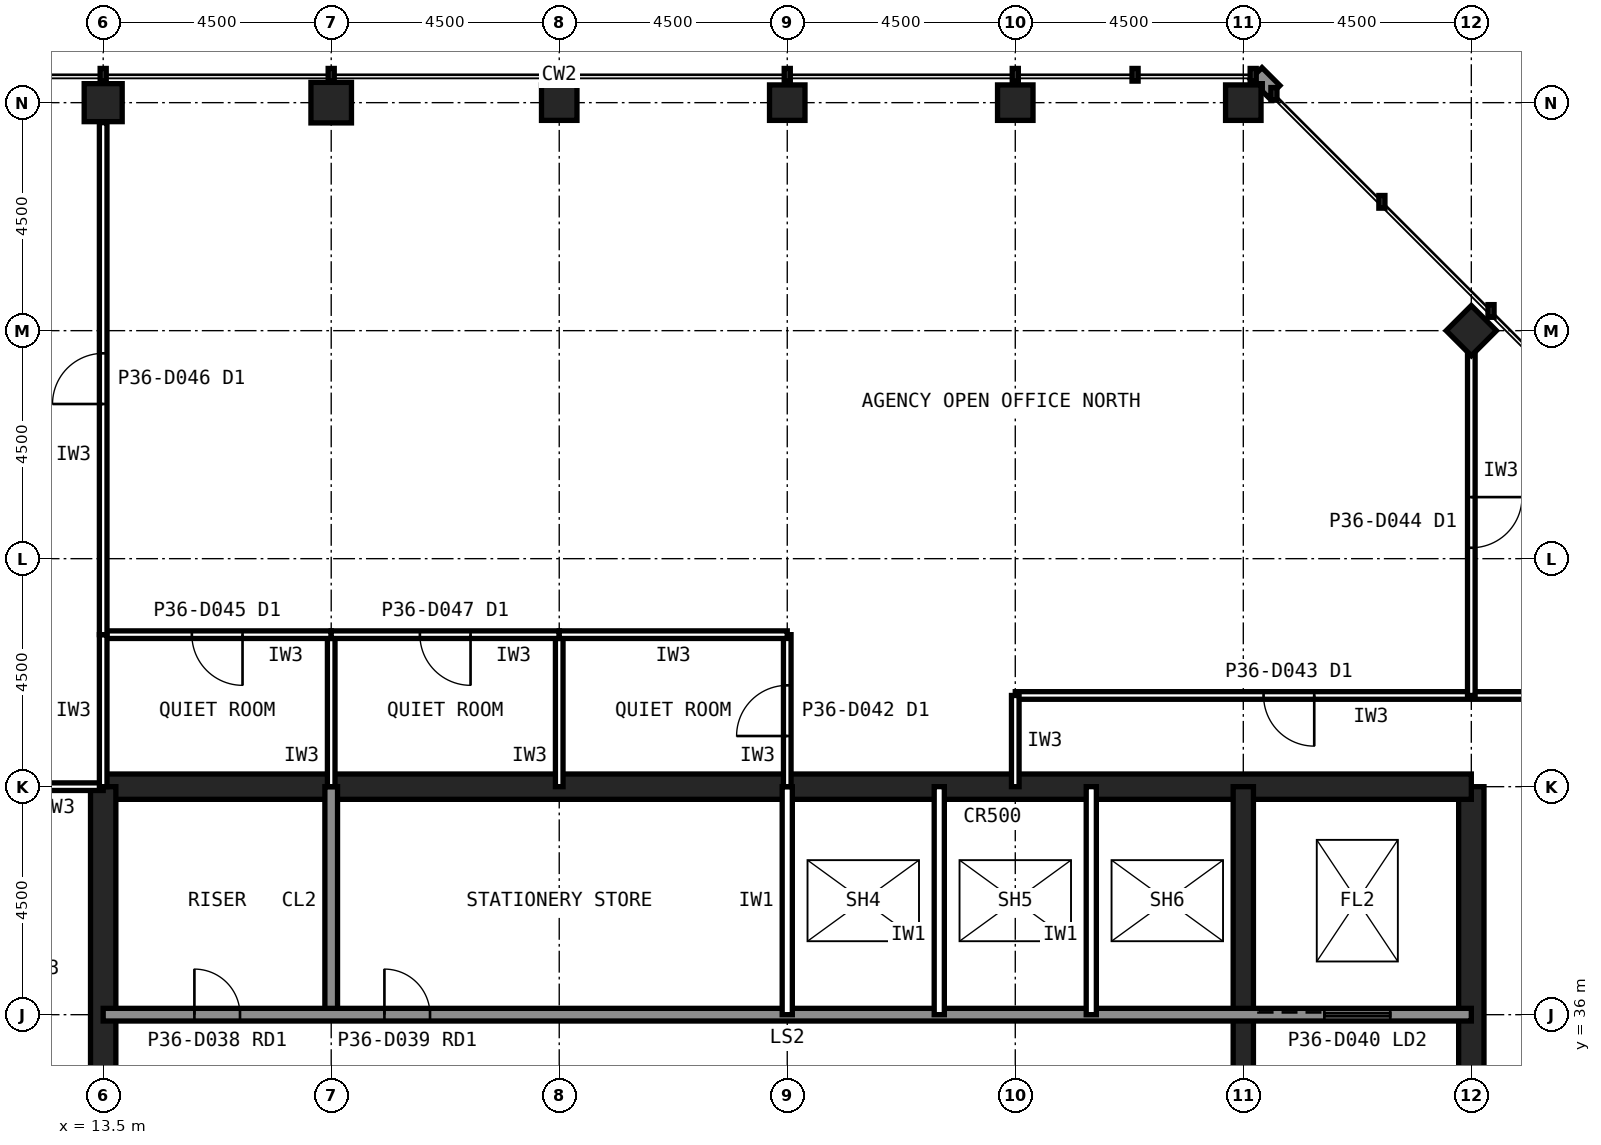
"""IFC4 building model, lengths in metres.
Left out: names, types, materials, properties, quantities, classifications, styles, units other than length and angle.
Written with IfcOpenShell. Run it as: python <this file> out.ifc"""

import sys

from ifc_helpers import new_model, si_unit, direction, frame, frame_2d, origin, origin_2d, place, context, subcontext, project, spatial, rectangle, hollow_rectangle, extrude, element, fill, save


model = new_model("IFC4")
c1 = context("Model", 3, precision=1e-05, world=origin(), true_north=direction((0.0, 1.0)))
c2 = subcontext(c1, "Body", "Model", "MODEL_VIEW")
j1 = project(units=[si_unit("LENGTHUNIT", "METRE"), si_unit("PLANEANGLEUNIT", "RADIAN")], contexts=[c1])
p1 = place(None, origin())
s1 = spatial("IfcSite", under=j1, at=p1, CompositionType="ELEMENT")
p2 = place(p1, origin())
s2 = spatial("IfcBuilding", under=s1, at=p2, CompositionType="ELEMENT")
p3 = place(p2, frame((0.0, 0.0, 151.6)))
s3 = spatial("IfcBuildingStorey", under=s2, at=p3, CompositionType="ELEMENT", Elevation=151.6)
for number, where, z_axis, x_axis in (
    (1, (36.0, 54.0, 0.0), (0.0, 0.0, 1.0), (1.0, 0.0, 0.0)),
    (2, (31.5, 54.0, 0.0), (0.0, 0.0, 1.0), (1.0, 0.0, 0.0)),
    (3, (27.0, 54.0, 0.0), (0.0, 0.0, 1.0), (1.0, 0.0, 0.0)),
    (4, (22.5, 54.0, 0.0), (0.0, 0.0, 1.0), (1.0, 0.0, 0.0)),
):
    element("IfcColumn", number, at=place(p3, frame(where, z_axis=z_axis, x_axis=x_axis)), inside=s3, PredefinedType="COLUMN", context=c2, shape_type="SweptSolid", body=[
        extrude(hollow_rectangle(XDim=0.75, YDim=0.75, WallThickness=0.04, at=origin_2d()), origin(), (0.0, 0.0, 1.0), 4.0),
    ])
p4 = place(p3, frame((18.0, 54.0, 0.0), z_axis=(0.0, 0.0, 1.0), x_axis=(1.0, 0.0, 0.0)))
e5 = element("IfcColumn", 5, at=p4, inside=s3, PredefinedType="COLUMN", context=c2, shape_type="SweptSolid", body=[
    extrude(hollow_rectangle(XDim=0.85, YDim=0.85, WallThickness=0.05, at=origin_2d()), origin(), (0.0, 0.0, 1.0), 4.0),
])
p5 = place(p3, frame((13.5, 54.0, 0.0), z_axis=(0.0, 0.0, 1.0), x_axis=(1.0, 0.0, 0.0)))
e6 = element("IfcColumn", 6, at=p5, inside=s3, PredefinedType="COLUMN", context=c2, shape_type="SweptSolid", body=[
    extrude(hollow_rectangle(XDim=0.8, YDim=0.8, WallThickness=0.045, at=origin_2d()), origin(), (0.0, 0.0, 1.0), 4.0),
])
p6 = place(p3, frame((40.5, 49.5, 0.0), z_axis=(0.0, 0.0, 1.0), x_axis=(0.707106781187, 0.707106781187, 0.0)))
e7 = element("IfcColumn", 7, at=p6, inside=s3, PredefinedType="COLUMN", context=c2, shape_type="SweptSolid", body=[
    extrude(hollow_rectangle(XDim=0.75, YDim=0.75, WallThickness=0.04, at=origin_2d()), origin(), (0.0, 0.0, 1.0), 4.0),
])
p7 = place(p3, frame((40.5, 13.5, 0.0), z_axis=(0.0, 0.0, 1.0), x_axis=(0.0, 1.0, 0.0)))
e8 = element("IfcWall", 8, at=p7, inside=s3, PredefinedType="SHEAR", context=c2, shape_type="SweptSolid", body=[
    extrude(rectangle(XDim=27.0, YDim=0.5, at=frame_2d((13.5, 0.0))), origin(), (0.0, 0.0, 1.0), 4.0),
])
p8 = place(p7, frame((5.85, 0.0, 0.0)))
e9 = element("IfcOpeningElement", 9, at=p8, cuts=e8, PredefinedType="OPENING", context=c2, shape_type="SweptSolid", body=[
    extrude(rectangle(XDim=1.8, YDim=2.1, at=frame_2d((0.9, 1.05))), frame((0.0, 0.26, 0.0), z_axis=(0.0, -1.0, 0.0), x_axis=(1.0, 0.0, 0.0)), (0.0, 0.0, 1.0), 0.52),
])
p9 = place(p7, frame((19.65, 0.0, 0.0)))
e10 = element("IfcOpeningElement", 10, at=p9, cuts=e8, PredefinedType="OPENING", context=c2, shape_type="SweptSolid", body=[
    extrude(rectangle(XDim=1.2, YDim=2.1, at=frame_2d((0.6, 1.05))), frame((0.0, 0.26, 0.0), z_axis=(0.0, -1.0, 0.0), x_axis=(1.0, 0.0, 0.0)), (0.0, 0.0, 1.0), 0.52),
])
p10 = place(p3, frame((40.5, 40.5, 0.0), z_axis=(0.0, 0.0, 1.0), x_axis=(-1.0, 0.0, 0.0)))
e11 = element("IfcWall", 11, at=p10, inside=s3, PredefinedType="SHEAR", context=c2, shape_type="SweptSolid", body=[
    extrude(rectangle(XDim=27.0, YDim=0.5, at=frame_2d((13.5, 0.0))), origin(), (0.0, 0.0, 1.0), 4.0),
])
p11 = place(p3, frame((13.5, 40.5, 0.0), z_axis=(0.0, 0.0, 1.0), x_axis=(0.0, -1.0, 0.0)))
e12 = element("IfcWall", 12, at=p11, inside=s3, PredefinedType="SHEAR", context=c2, shape_type="SweptSolid", body=[
    extrude(rectangle(XDim=27.0, YDim=0.5, at=frame_2d((13.5, 0.0))), origin(), (0.0, 0.0, 1.0), 4.0),
])
p12 = place(p11, frame((19.65, 0.0, 0.0)))
e13 = element("IfcOpeningElement", 13, at=p12, cuts=e12, PredefinedType="OPENING", context=c2, shape_type="SweptSolid", body=[
    extrude(rectangle(XDim=1.2, YDim=2.1, at=frame_2d((0.6, 1.05))), frame((0.0, 0.26, 0.0), z_axis=(0.0, -1.0, 0.0), x_axis=(1.0, 0.0, 0.0)), (0.0, 0.0, 1.0), 0.52),
])
p13 = place(p11, frame((5.85, 0.0, 0.0)))
e14 = element("IfcOpeningElement", 14, at=p13, cuts=e12, PredefinedType="OPENING", context=c2, shape_type="SweptSolid", body=[
    extrude(rectangle(XDim=1.8, YDim=2.1, at=frame_2d((0.9, 1.05))), frame((0.0, 0.26, 0.0), z_axis=(0.0, -1.0, 0.0), x_axis=(1.0, 0.0, 0.0)), (0.0, 0.0, 1.0), 0.52),
])
p14 = place(p3, frame((18.0, 36.0, 0.0), z_axis=(0.0, 0.0, 1.0), x_axis=(0.0, 1.0, 0.0)))
e15 = element("IfcWall", 15, at=p14, inside=s3, PredefinedType="SOLIDWALL", context=c2, shape_type="SweptSolid", body=[
    extrude(rectangle(XDim=4.5, YDim=0.25, at=frame_2d((2.25, 0.0))), origin(), (0.0, 0.0, 1.0), 3.84),
])
p15 = place(p3, frame((36.0, 22.5, 0.0), z_axis=(0.0, 0.0, 1.0), x_axis=(0.0, 1.0, 0.0)))
e16 = element("IfcWall", 16, at=p15, inside=s3, PredefinedType="SHEAR", context=c2, shape_type="SweptSolid", body=[
    extrude(rectangle(XDim=18.0, YDim=0.4, at=frame_2d((9.0, 0.0))), origin(), (0.0, 0.0, 1.0), 4.0),
])
p16 = place(p3, frame((13.5, 36.0, 0.0), z_axis=(0.0, 0.0, 1.0), x_axis=(1.0, 0.0, 0.0)))
e17 = element("IfcWall", 17, at=p16, inside=s3, PredefinedType="SOLIDWALL", context=c2, shape_type="SweptSolid", body=[
    extrude(rectangle(XDim=27.0, YDim=0.25, at=frame_2d((13.5, 0.0))), origin(), (0.0, 0.0, 1.0), 3.84),
])
p17 = place(p16, frame((1.8, 0.0, 0.0)))
e18 = element("IfcOpeningElement", 18, at=p17, cuts=e17, PredefinedType="OPENING", context=c2, shape_type="SweptSolid", body=[
    extrude(rectangle(XDim=0.9, YDim=2.1, at=frame_2d((0.45, 1.05))), frame((0.0, 0.135, 0.0), z_axis=(0.0, -1.0, 0.0), x_axis=(1.0, 0.0, 0.0)), (0.0, 0.0, 1.0), 0.27),
])
p18 = place(p16, frame((5.55, 0.0, 0.0)))
e19 = element("IfcOpeningElement", 19, at=p18, cuts=e17, PredefinedType="OPENING", context=c2, shape_type="SweptSolid", body=[
    extrude(rectangle(XDim=0.9, YDim=2.1, at=frame_2d((0.45, 1.05))), frame((0.0, 0.135, 0.0), z_axis=(0.0, -1.0, 0.0), x_axis=(1.0, 0.0, 0.0)), (0.0, 0.0, 1.0), 0.27),
])
p19 = place(p16, frame((8.55, 0.0, 0.0)))
e20 = element("IfcOpeningElement", 20, at=p19, cuts=e17, PredefinedType="OPENING", context=c2, shape_type="SweptSolid", body=[
    extrude(rectangle(XDim=0.9, YDim=2.1, at=frame_2d((0.45, 1.05))), frame((0.0, 0.135, 0.0), z_axis=(0.0, -1.0, 0.0), x_axis=(1.0, 0.0, 0.0)), (0.0, 0.0, 1.0), 0.27),
])
p20 = place(p16, frame((24.1, 0.0, 0.0)))
e21 = element("IfcOpeningElement", 21, at=p20, cuts=e17, PredefinedType="OPENING", context=c2, shape_type="SweptSolid", body=[
    extrude(rectangle(XDim=1.3, YDim=2.2, at=frame_2d((0.65, 1.1))), frame((0.0, 0.135, 0.0), z_axis=(0.0, -1.0, 0.0), x_axis=(1.0, 0.0, 0.0)), (0.0, 0.0, 1.0), 0.27),
])
for number, where, z_axis, x_axis in (
    (22, (21.0, 36.0, 0.0), (0.0, 0.0, 1.0), (0.0, 1.0, 0.0)),
    (23, (27.0, 36.0, 0.0), (0.0, 0.0, 1.0), (0.0, 1.0, 0.0)),
    (24, (30.0, 36.0, 0.0), (0.0, 0.0, 1.0), (0.0, 1.0, 0.0)),
    (25, (33.0, 36.0, 0.0), (0.0, 0.0, 1.0), (0.0, 1.0, 0.0)),
):
    element("IfcWall", number, at=place(p3, frame(where, z_axis=z_axis, x_axis=x_axis)), inside=s3, PredefinedType="PARTITIONING", context=c2, shape_type="SweptSolid", body=[
        extrude(rectangle(XDim=4.5, YDim=0.2, at=frame_2d((2.25, 0.0))), origin(), (0.0, 0.0, 1.0), 3.84),
    ])
p21 = place(p3, frame((42.3, 40.5, 0.0), z_axis=(0.0, 0.0, 1.0), x_axis=(-1.0, 0.0, 0.0)))
e26 = element("IfcWall", 26, at=p21, inside=s3, PredefinedType="PARTITIONING", context=c2, shape_type="SweptSolid", body=[
    extrude(rectangle(XDim=1.81, YDim=0.15, at=frame_2d((0.905, 0.0))), origin(), (0.0, 0.0, 1.0), 2.989),
])
p22 = place(p3, frame((13.5, 40.5, 0.0), z_axis=(0.0, 0.0, 1.0), x_axis=(-1.0, 0.0, 0.0)))
e27 = element("IfcWall", 27, at=p22, inside=s3, PredefinedType="PARTITIONING", context=c2, shape_type="SweptSolid", body=[
    extrude(rectangle(XDim=1.8, YDim=0.15, at=frame_2d((0.9, 0.0))), origin(), (0.0, 0.0, 1.0), 2.989),
])
p23 = place(p3, frame((18.0, 40.5, 0.0), z_axis=(0.0, 0.0, 1.0), x_axis=(0.0, 1.0, 0.0)))
e28 = element("IfcWall", 28, at=p23, inside=s3, PredefinedType="PARTITIONING", context=c2, shape_type="SweptSolid", body=[
    extrude(rectangle(XDim=3.0, YDim=0.15, at=frame_2d((1.5, 0.0))), origin(), (0.0, 0.0, 1.0), 2.989),
])
p24 = place(p3, frame((18.0, 43.5, 0.0), z_axis=(0.0, 0.0, 1.0), x_axis=(-1.0, 0.0, 0.0)))
e29 = element("IfcWall", 29, at=p24, inside=s3, PredefinedType="PARTITIONING", context=c2, shape_type="SweptSolid", body=[
    extrude(rectangle(XDim=4.5, YDim=0.15, at=frame_2d((2.25, 0.0))), origin(), (0.0, 0.0, 1.0), 3.84),
])
p25 = place(p24, frame((1.75, 0.0, 0.0)))
e30 = element("IfcOpeningElement", 30, at=p25, cuts=e29, PredefinedType="OPENING", context=c2, shape_type="SweptSolid", body=[
    extrude(rectangle(XDim=1.0, YDim=2.1, at=frame_2d((0.5, 1.05))), frame((0.0, 0.085, 0.0), z_axis=(0.0, -1.0, 0.0), x_axis=(1.0, 0.0, 0.0)), (0.0, 0.0, 1.0), 0.17),
])
for number, where, z_axis, x_axis in (
    (31, (13.5, 43.5, 0.0), (0.0, 0.0, 1.0), (0.0, -1.0, 0.0)),
    (32, (22.5, 40.5, 0.0), (0.0, 0.0, 1.0), (0.0, 1.0, 0.0)),
):
    element("IfcWall", number, at=place(p3, frame(where, z_axis=z_axis, x_axis=x_axis)), inside=s3, PredefinedType="PARTITIONING", context=c2, shape_type="SweptSolid", body=[
        extrude(rectangle(XDim=3.0, YDim=0.15, at=frame_2d((1.5, 0.0))), origin(), (0.0, 0.0, 1.0), 2.989),
    ])
p26 = place(p3, frame((22.5, 43.5, 0.0), z_axis=(0.0, 0.0, 1.0), x_axis=(-1.0, 0.0, 0.0)))
e33 = element("IfcWall", 33, at=p26, inside=s3, PredefinedType="PARTITIONING", context=c2, shape_type="SweptSolid", body=[
    extrude(rectangle(XDim=4.5, YDim=0.15, at=frame_2d((2.25, 0.0))), origin(), (0.0, 0.0, 1.0), 3.84),
])
p27 = place(p26, frame((1.75, 0.0, 0.0)))
e34 = element("IfcOpeningElement", 34, at=p27, cuts=e33, PredefinedType="OPENING", context=c2, shape_type="SweptSolid", body=[
    extrude(rectangle(XDim=1.0, YDim=2.1, at=frame_2d((0.5, 1.05))), frame((0.0, 0.085, 0.0), z_axis=(0.0, -1.0, 0.0), x_axis=(1.0, 0.0, 0.0)), (0.0, 0.0, 1.0), 0.17),
])
p28 = place(p3, frame((27.0, 40.5, 0.0), z_axis=(0.0, 0.0, 1.0), x_axis=(0.0, 1.0, 0.0)))
e35 = element("IfcWall", 35, at=p28, inside=s3, PredefinedType="PARTITIONING", context=c2, shape_type="SweptSolid", body=[
    extrude(rectangle(XDim=3.0, YDim=0.15, at=frame_2d((1.5, 0.0))), origin(), (0.0, 0.0, 1.0), 2.989),
])
p29 = place(p28, frame((1.0, 0.0, 0.0)))
e36 = element("IfcOpeningElement", 36, at=p29, cuts=e35, PredefinedType="OPENING", context=c2, shape_type="SweptSolid", body=[
    extrude(rectangle(XDim=1.0, YDim=2.1, at=frame_2d((0.5, 1.05))), frame((0.0, 0.085, 0.0), z_axis=(0.0, -1.0, 0.0), x_axis=(1.0, 0.0, 0.0)), (0.0, 0.0, 1.0), 0.17),
])
p30 = place(p3, frame((27.0, 43.5, 0.0), z_axis=(0.0, 0.0, 1.0), x_axis=(-1.0, 0.0, 0.0)))
e37 = element("IfcWall", 37, at=p30, inside=s3, PredefinedType="PARTITIONING", context=c2, shape_type="SweptSolid", body=[
    extrude(rectangle(XDim=4.5, YDim=0.15, at=frame_2d((2.25, 0.0))), origin(), (0.0, 0.0, 1.0), 3.84),
])
p31 = place(p3, frame((13.5, 43.5, 0.0), z_axis=(0.0, 0.0, 1.0), x_axis=(0.0, 1.0, 0.0)))
e38 = element("IfcWall", 38, at=p31, inside=s3, PredefinedType="PARTITIONING", context=c2, shape_type="SweptSolid", body=[
    extrude(rectangle(XDim=10.08, YDim=0.15, at=frame_2d((5.04, 0.0))), origin(), (0.0, 0.0, 1.0), 2.989),
])
p32 = place(p31, frame((4.54, 0.0, 0.0)))
e39 = element("IfcOpeningElement", 39, at=p32, cuts=e38, PredefinedType="OPENING", context=c2, shape_type="SweptSolid", body=[
    extrude(rectangle(XDim=1.0, YDim=2.1, at=frame_2d((0.5, 1.05))), frame((0.0, 0.085, 0.0), z_axis=(0.0, -1.0, 0.0), x_axis=(1.0, 0.0, 0.0)), (0.0, 0.0, 1.0), 0.17),
])
p33 = place(p3, frame((40.5, 49.105, 0.0), z_axis=(0.0, 0.0, 1.0), x_axis=(0.0, -1.0, 0.0)))
e40 = element("IfcWall", 40, at=p33, inside=s3, PredefinedType="PARTITIONING", context=c2, shape_type="SweptSolid", body=[
    extrude(rectangle(XDim=8.605, YDim=0.15, at=frame_2d((4.302, 0.0))), origin(), (0.0, 0.0, 1.0), 2.989),
])
p34 = place(p33, frame((3.802, 0.0, 0.0)))
e41 = element("IfcOpeningElement", 41, at=p34, cuts=e40, PredefinedType="OPENING", context=c2, shape_type="SweptSolid", body=[
    extrude(rectangle(XDim=1.0, YDim=2.1, at=frame_2d((0.5, 1.05))), frame((0.0, 0.085, 0.0), z_axis=(0.0, -1.0, 0.0), x_axis=(1.0, 0.0, 0.0)), (0.0, 0.0, 1.0), 0.17),
])
p35 = place(p17, origin())
e42 = element("IfcDoor", 42, at=p35, inside=s3, OperationType="SINGLE_SWING_LEFT", PredefinedType="DOOR", context=c2, shape_type="SweptSolid", body=[
    extrude(rectangle(XDim=0.9, YDim=2.1, at=frame_2d((0.45, 1.05))), frame((0.0, 0.025, 0.0), z_axis=(0.0, -1.0, 0.0), x_axis=(1.0, 0.0, 0.0)), (0.0, 0.0, 1.0), 0.05),
])
fill(e18, e42)
p36 = place(p18, origin())
e43 = element("IfcDoor", 43, at=p36, inside=s3, OperationType="SINGLE_SWING_LEFT", PredefinedType="DOOR", context=c2, shape_type="SweptSolid", body=[
    extrude(rectangle(XDim=0.9, YDim=2.1, at=frame_2d((0.45, 1.05))), frame((0.0, 0.025, 0.0), z_axis=(0.0, -1.0, 0.0), x_axis=(1.0, 0.0, 0.0)), (0.0, 0.0, 1.0), 0.05),
])
fill(e19, e43)
p37 = place(p19, origin())
e44 = element("IfcDoor", 44, at=p37, inside=s3, OperationType="SINGLE_SWING_LEFT", PredefinedType="DOOR", context=c2, shape_type="SweptSolid", body=[
    extrude(rectangle(XDim=0.9, YDim=2.1, at=frame_2d((0.45, 1.05))), frame((0.0, 0.025, 0.0), z_axis=(0.0, -1.0, 0.0), x_axis=(1.0, 0.0, 0.0)), (0.0, 0.0, 1.0), 0.05),
])
fill(e20, e44)
p38 = place(p20, origin())
e45 = element("IfcDoor", 45, at=p38, inside=s3, OperationType="SLIDING_TO_LEFT", PredefinedType="DOOR", context=c2, shape_type="SweptSolid", body=[
    extrude(rectangle(XDim=1.3, YDim=2.2, at=frame_2d((0.65, 1.1))), frame((0.0, 0.025, 0.0), z_axis=(0.0, -1.0, 0.0), x_axis=(1.0, 0.0, 0.0)), (0.0, 0.0, 1.0), 0.05),
])
fill(e21, e45)
p39 = place(p25, origin())
e46 = element("IfcDoor", 46, at=p39, inside=s3, OperationType="SINGLE_SWING_LEFT", PredefinedType="DOOR", context=c2, shape_type="SweptSolid", body=[
    extrude(rectangle(XDim=1.0, YDim=2.1, at=frame_2d((0.5, 1.05))), frame((0.0, 0.025, 0.0), z_axis=(0.0, -1.0, 0.0), x_axis=(1.0, 0.0, 0.0)), (0.0, 0.0, 1.0), 0.05),
])
fill(e30, e46)
p40 = place(p27, origin())
e47 = element("IfcDoor", 47, at=p40, inside=s3, OperationType="SINGLE_SWING_LEFT", PredefinedType="DOOR", context=c2, shape_type="SweptSolid", body=[
    extrude(rectangle(XDim=1.0, YDim=2.1, at=frame_2d((0.5, 1.05))), frame((0.0, 0.025, 0.0), z_axis=(0.0, -1.0, 0.0), x_axis=(1.0, 0.0, 0.0)), (0.0, 0.0, 1.0), 0.05),
])
fill(e34, e47)
p41 = place(p29, origin())
e48 = element("IfcDoor", 48, at=p41, inside=s3, OperationType="SINGLE_SWING_LEFT", PredefinedType="DOOR", context=c2, shape_type="SweptSolid", body=[
    extrude(rectangle(XDim=1.0, YDim=2.1, at=frame_2d((0.5, 1.05))), frame((0.0, 0.025, 0.0), z_axis=(0.0, -1.0, 0.0), x_axis=(1.0, 0.0, 0.0)), (0.0, 0.0, 1.0), 0.05),
])
fill(e36, e48)
p42 = place(p32, origin())
e49 = element("IfcDoor", 49, at=p42, inside=s3, OperationType="SINGLE_SWING_LEFT", PredefinedType="DOOR", context=c2, shape_type="SweptSolid", body=[
    extrude(rectangle(XDim=1.0, YDim=2.1, at=frame_2d((0.5, 1.05))), frame((0.0, 0.025, 0.0), z_axis=(0.0, -1.0, 0.0), x_axis=(1.0, 0.0, 0.0)), (0.0, 0.0, 1.0), 0.05),
])
fill(e39, e49)
p43 = place(p34, origin())
e50 = element("IfcDoor", 50, at=p43, inside=s3, OperationType="SINGLE_SWING_LEFT", PredefinedType="DOOR", context=c2, shape_type="SweptSolid", body=[
    extrude(rectangle(XDim=1.0, YDim=2.1, at=frame_2d((0.5, 1.05))), frame((0.0, 0.025, 0.0), z_axis=(0.0, -1.0, 0.0), x_axis=(1.0, 0.0, 0.0)), (0.0, 0.0, 1.0), 0.05),
])
fill(e41, e50)
save(model, sys.argv[1])
